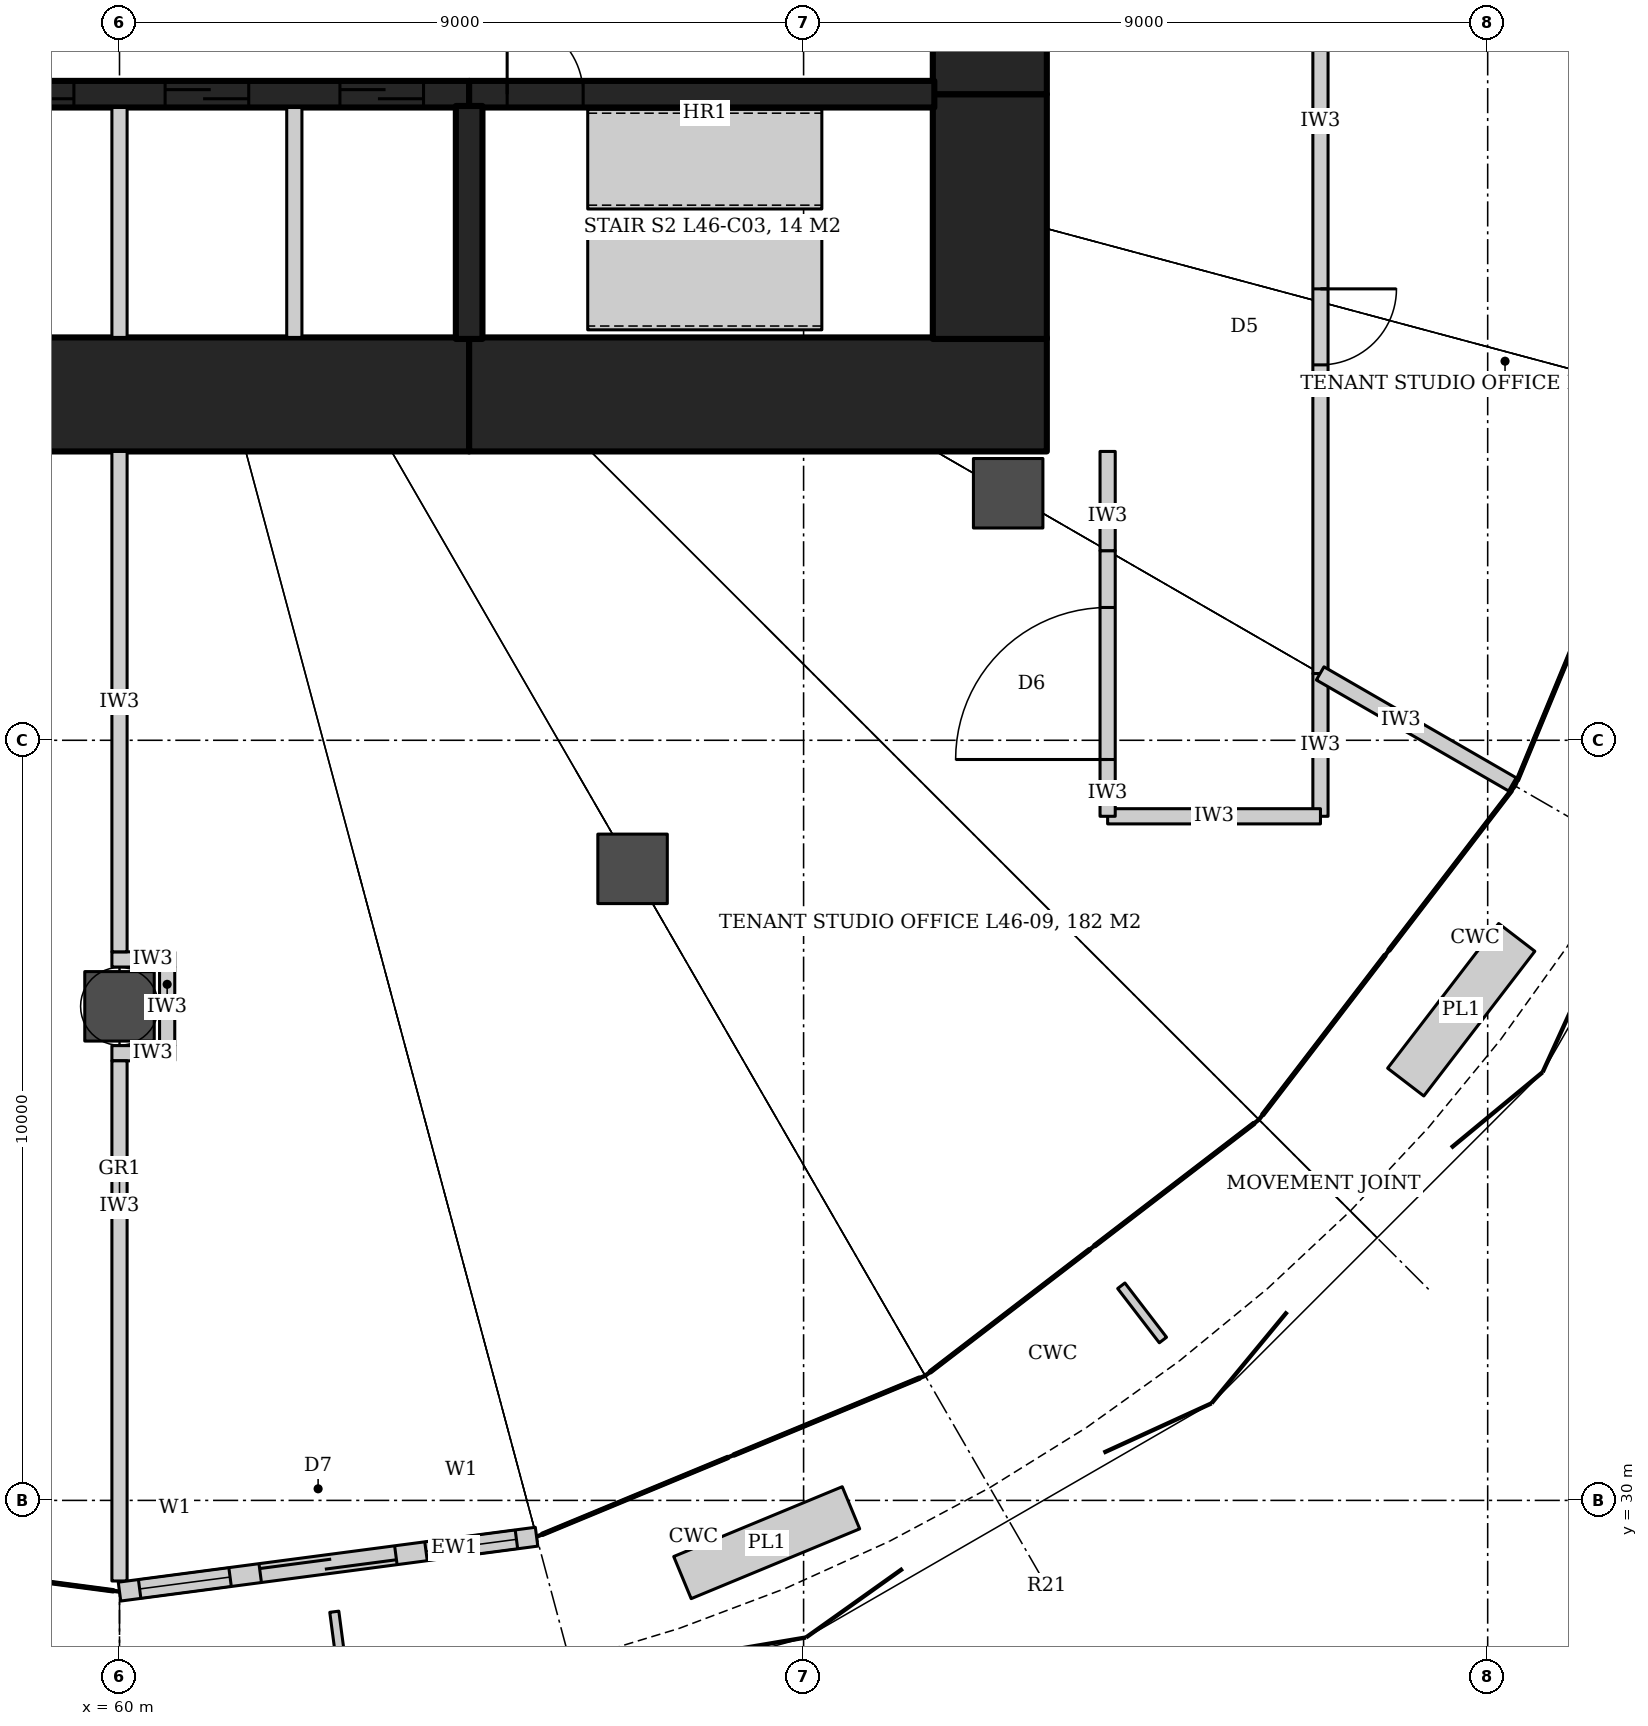
"""IFC4 building model, lengths in metres.
Left out: names, types, materials, properties, quantities, classifications, styles, units other than length and angle.
Written with IfcOpenShell. Run it as: python <this file> out.ifc"""

import sys

from ifc_helpers import new_model, si_unit, direction, frame, frame_2d, origin, origin_2d, place, context, subcontext, project, spatial, rectangle, hollow_circle, extrude, element, fill, save


model = new_model("IFC4")
c1 = context("Model", 3, precision=1e-05, world=origin(), true_north=direction((0.0, 1.0)))
c2 = subcontext(c1, "Body", "Model", "MODEL_VIEW")
j1 = project(units=[si_unit("LENGTHUNIT", "METRE"), si_unit("PLANEANGLEUNIT", "RADIAN")], contexts=[c1])
p1 = place(None, origin())
s1 = spatial("IfcSite", under=j1, at=p1, CompositionType="ELEMENT")
p2 = place(p1, origin())
s2 = spatial("IfcBuilding", under=s1, at=p2, CompositionType="ELEMENT")
p3 = place(p2, frame((0.0, 0.0, 202.4)))
s3 = spatial("IfcBuildingStorey", under=s2, at=p3, CompositionType="ELEMENT", Elevation=202.4)
p4 = place(p3, frame((55.4, 44.55, 0.0), z_axis=(0.0, 0.0, 1.0), x_axis=(1.0, 0.0, 0.0)))
e1 = element("IfcWall", 1, at=p4, inside=s3, PredefinedType="SHEAR", context=c2, shape_type="SweptSolid", body=[
    extrude(rectangle(XDim=9.2, YDim=1.5, at=frame_2d((4.6, 0.0))), origin(), (0.0, 0.0, 1.0), 4.2),
])
p5 = place(p3, frame((64.6, 44.55, 0.0), z_axis=(0.0, 0.0, 1.0), x_axis=(1.0, 0.0, 0.0)))
e2 = element("IfcWall", 2, at=p5, inside=s3, PredefinedType="SHEAR", context=c2, shape_type="SweptSolid", body=[
    extrude(rectangle(XDim=7.6, YDim=1.5, at=frame_2d((3.8, 0.0))), origin(), (0.0, 0.0, 1.0), 4.2),
])
p6 = place(p3, frame((71.45, 45.28, 0.0), z_axis=(0.0, 0.0, 1.0), x_axis=(0.0, 1.0, 0.0)))
e3 = element("IfcWall", 3, at=p6, inside=s3, PredefinedType="SHEAR", context=c2, shape_type="SweptSolid", body=[
    extrude(rectangle(XDim=3.22, YDim=1.5, at=frame_2d((1.61, 0.0))), origin(), (0.0, 0.0, 1.0), 4.2),
])
p7 = place(p3, frame((71.45, 48.5, 0.0), z_axis=(0.0, 0.0, 1.0), x_axis=(0.0, 1.0, 0.0)))
e4 = element("IfcWall", 4, at=p7, inside=s3, PredefinedType="SHEAR", context=c2, shape_type="SweptSolid", body=[
    extrude(rectangle(XDim=3.0, YDim=1.5, at=frame_2d((1.5, 0.0))), origin(), (0.0, 0.0, 1.0), 4.2),
])
p8 = place(p7, frame((0.6, 0.0, 0.0)))
e5 = element("IfcOpeningElement", 5, at=p8, cuts=e4, PredefinedType="OPENING", context=c2, shape_type="SweptSolid", body=[
    extrude(rectangle(XDim=1.8, YDim=2.1, at=frame_2d((0.9, 1.05))), frame((0.0, 0.76, 0.0), z_axis=(0.0, -1.0, 0.0), x_axis=(1.0, 0.0, 0.0)), (0.0, 0.0, 1.0), 1.52),
])
p9 = place(p3, frame((55.4, 48.5, 0.0), z_axis=(0.0, 0.0, 1.0), x_axis=(1.0, 0.0, 0.0)))
e6 = element("IfcWall", 6, at=p9, inside=s3, PredefinedType="SHEAR", context=c2, shape_type="SweptSolid", body=[
    extrude(rectangle(XDim=9.2, YDim=0.35, at=frame_2d((4.6, 0.0))), origin(), (0.0, 0.0, 1.0), 4.2),
])
p10 = place(p9, frame((0.6, 0.0, 0.0)))
e7 = element("IfcOpeningElement", 7, at=p10, cuts=e6, PredefinedType="OPENING", context=c2, shape_type="SweptSolid", body=[
    extrude(rectangle(XDim=1.1, YDim=2.1, at=frame_2d((0.55, 1.05))), frame((0.0, 0.185, 0.0), z_axis=(0.0, -1.0, 0.0), x_axis=(1.0, 0.0, 0.0)), (0.0, 0.0, 1.0), 0.37),
])
p11 = place(p9, frame((2.9, 0.0, 0.0)))
e8 = element("IfcOpeningElement", 8, at=p11, cuts=e6, PredefinedType="OPENING", context=c2, shape_type="SweptSolid", body=[
    extrude(rectangle(XDim=1.1, YDim=2.1, at=frame_2d((0.55, 1.05))), frame((0.0, 0.185, 0.0), z_axis=(0.0, -1.0, 0.0), x_axis=(1.0, 0.0, 0.0)), (0.0, 0.0, 1.0), 0.37),
])
p12 = place(p9, frame((5.2, 0.0, 0.0)))
e9 = element("IfcOpeningElement", 9, at=p12, cuts=e6, PredefinedType="OPENING", context=c2, shape_type="SweptSolid", body=[
    extrude(rectangle(XDim=1.1, YDim=2.1, at=frame_2d((0.55, 1.05))), frame((0.0, 0.185, 0.0), z_axis=(0.0, -1.0, 0.0), x_axis=(1.0, 0.0, 0.0)), (0.0, 0.0, 1.0), 0.37),
])
p13 = place(p9, frame((7.5, 0.0, 0.0)))
e10 = element("IfcOpeningElement", 10, at=p13, cuts=e6, PredefinedType="OPENING", context=c2, shape_type="SweptSolid", body=[
    extrude(rectangle(XDim=1.1, YDim=2.1, at=frame_2d((0.55, 1.05))), frame((0.0, 0.185, 0.0), z_axis=(0.0, -1.0, 0.0), x_axis=(1.0, 0.0, 0.0)), (0.0, 0.0, 1.0), 0.37),
])
p14 = place(p3, frame((64.6, 48.5, 0.0), z_axis=(0.0, 0.0, 1.0), x_axis=(1.0, 0.0, 0.0)))
e11 = element("IfcWall", 11, at=p14, inside=s3, PredefinedType="SHEAR", context=c2, shape_type="SweptSolid", body=[
    extrude(rectangle(XDim=6.12, YDim=0.35, at=frame_2d((3.06, 0.0))), origin(), (0.0, 0.0, 1.0), 4.2),
])
p15 = place(p14, frame((0.5, 0.0, 0.0)))
e12 = element("IfcOpeningElement", 12, at=p15, cuts=e11, PredefinedType="OPENING", context=c2, shape_type="SweptSolid", body=[
    extrude(rectangle(XDim=1.0, YDim=2.1, at=frame_2d((0.5, 1.05))), frame((0.0, 0.185, 0.0), z_axis=(0.0, -1.0, 0.0), x_axis=(1.0, 0.0, 0.0)), (0.0, 0.0, 1.0), 0.37),
])
p16 = place(p3, frame((64.6, 48.345, 0.0), z_axis=(0.0, 0.0, 1.0), x_axis=(0.0, -1.0, 0.0)))
e13 = element("IfcWall", 13, at=p16, inside=s3, PredefinedType="SHEAR", context=c2, shape_type="SweptSolid", body=[
    extrude(rectangle(XDim=3.065, YDim=0.35, at=frame_2d((1.532, 0.0))), origin(), (0.0, 0.0, 1.0), 4.2),
])
for number, where, z_axis, x_axis in (
    (14, (60.0, 36.5, 0.0), (0.0, 0.0, 1.0), (1.0, 0.0, 0.0)),
    (15, (66.75, 38.309, 0.0), (0.0, 0.0, 1.0), (1.0, 0.0, 0.0)),
    (16, (71.691, 43.25, 0.0), (0.0, 0.0, 1.0), (1.0, 0.0, 0.0)),
):
    element("IfcColumn", number, at=place(p3, frame(where, z_axis=z_axis, x_axis=x_axis)), inside=s3, PredefinedType="COLUMN", context=c2, shape_type="SweptSolid", body=[
        extrude(hollow_circle(Radius=0.457, WallThickness=0.045, at=origin_2d()), origin(), (0.0, 0.0, 1.0), 4.2),
    ])
p17 = place(p3, frame((75.8, 50.0, 0.0), z_axis=(0.0, 0.0, 1.0), x_axis=(0.0, -1.0, 0.0)))
e17 = element("IfcWall", 17, at=p17, inside=s3, PredefinedType="PARTITIONING", context=c2, shape_type="SweptSolid", body=[
    extrude(rectangle(XDim=9.122, YDim=0.2, at=frame_2d((4.561, 0.0))), origin(), (0.0, 0.0, 1.0), 3.012),
])
p18 = place(p17, frame((4.061, 0.0, 0.0)))
e18 = element("IfcOpeningElement", 18, at=p18, cuts=e17, PredefinedType="OPENING", context=c2, shape_type="SweptSolid", body=[
    extrude(rectangle(XDim=1.0, YDim=2.1, at=frame_2d((0.5, 1.05))), frame((0.0, 0.11, 0.0), z_axis=(0.0, -1.0, 0.0), x_axis=(1.0, 0.0, 0.0)), (0.0, 0.0, 1.0), 0.22),
])
p19 = place(p3, frame((75.8, 40.878, 0.0), z_axis=(0.0, 0.0, 1.0), x_axis=(0.0, -1.0, 0.0)))
e19 = element("IfcWall", 19, at=p19, inside=s3, PredefinedType="PARTITIONING", context=c2, shape_type="SweptSolid", body=[
    extrude(rectangle(XDim=1.878, YDim=0.2, at=frame_2d((0.939, 0.0))), origin(), (0.0, 0.0, 1.0), 3.012),
])
p20 = place(p3, frame((75.8, 39.0, 0.0), z_axis=(0.0, 0.0, 1.0), x_axis=(-1.0, 0.0, 0.0)))
e20 = element("IfcWall", 20, at=p20, inside=s3, PredefinedType="PARTITIONING", context=c2, shape_type="SweptSolid", body=[
    extrude(rectangle(XDim=2.8, YDim=0.2, at=frame_2d((1.4, 0.0))), origin(), (0.0, 0.0, 1.0), 3.04),
])
p21 = place(p3, frame((73.0, 39.0, 0.0), z_axis=(0.0, 0.0, 1.0), x_axis=(0.0, 1.0, 0.0)))
e21 = element("IfcWall", 21, at=p21, inside=s3, PredefinedType="PARTITIONING", context=c2, shape_type="SweptSolid", body=[
    extrude(rectangle(XDim=3.494, YDim=0.2, at=frame_2d((1.747, 0.0))), origin(), (0.0, 0.0, 1.0), 3.012),
])
p22 = place(p21, frame((0.747, 0.0, 0.0)))
e22 = element("IfcOpeningElement", 22, at=p22, cuts=e21, PredefinedType="OPENING", context=c2, shape_type="SweptSolid", body=[
    extrude(rectangle(XDim=2.0, YDim=2.1, at=frame_2d((1.0, 1.05))), frame((0.0, 0.11, 0.0), z_axis=(0.0, -1.0, 0.0), x_axis=(1.0, 0.0, 0.0)), (0.0, 0.0, 1.0), 0.22),
])
p23 = place(p3, frame((73.0, 42.494, 0.0), z_axis=(0.0, 0.0, 1.0), x_axis=(0.0, 1.0, 0.0)))
e23 = element("IfcWall", 23, at=p23, inside=s3, PredefinedType="PARTITIONING", context=c2, shape_type="SweptSolid", body=[
    extrude(rectangle(XDim=1.306, YDim=0.2, at=frame_2d((0.653, 0.0))), origin(), (0.0, 0.0, 1.0), 3.012),
])
for number, where, z_axis, x_axis in (
    (24, (59.9, 37.117, 0.0), (0.0, 0.0, 1.0), (1.0, 0.0, 0.0)),
    (25, (59.9, 35.883, 0.0), (0.0, 0.0, 1.0), (1.0, 0.0, 0.0)),
):
    element("IfcWall", number, at=place(p3, frame(where, z_axis=z_axis, x_axis=x_axis)), inside=s3, PredefinedType="PARTITIONING", context=c2, shape_type="SweptSolid", body=[
        extrude(rectangle(XDim=0.827, YDim=0.2, at=frame_2d((0.414, 0.0))), origin(), (0.0, 0.0, 1.0), 3.012),
    ])
p24 = place(p3, frame((60.627, 37.017, 0.0), z_axis=(0.0, 0.0, 1.0), x_axis=(0.0, -1.0, 0.0)))
e26 = element("IfcWall", 26, at=p24, inside=s3, PredefinedType="PARTITIONING", context=c2, shape_type="SweptSolid", body=[
    extrude(rectangle(XDim=1.034, YDim=0.2, at=frame_2d((0.517, 0.0))), origin(), (0.0, 0.0, 1.0), 3.012),
])
p25 = place(p3, frame((60.0, 43.8, 0.0), z_axis=(0.0, 0.0, 1.0), x_axis=(0.0, -1.0, 0.0)))
e27 = element("IfcWall", 27, at=p25, inside=s3, PredefinedType="PARTITIONING", context=c2, shape_type="SweptSolid", body=[
    extrude(rectangle(XDim=6.583, YDim=0.2, at=frame_2d((3.292, 0.0))), origin(), (0.0, 0.0, 1.0), 3.04),
])
p26 = place(p3, frame((60.0, 35.783, 0.0), z_axis=(0.0, 0.0, 1.0), x_axis=(0.0, -1.0, 0.0)))
e28 = element("IfcWall", 28, at=p26, inside=s3, PredefinedType="PARTITIONING", context=c2, shape_type="SweptSolid", body=[
    extrude(rectangle(XDim=6.843, YDim=0.2, at=frame_2d((3.421, 0.0))), origin(), (0.0, 0.0, 1.0), 3.012),
])
p27 = place(p3, frame((75.796, 40.88, 0.0), z_axis=(0.0, 0.0, 1.0), x_axis=(0.866032430508, -0.49998782916, 0.0)))
e29 = element("IfcWall", 29, at=p27, inside=s3, PredefinedType="PARTITIONING", context=c2, shape_type="SweptSolid", body=[
    extrude(rectangle(XDim=2.92, YDim=0.2, at=frame_2d((1.46, 0.0))), origin(), (0.0, 0.0, 1.0), 3.012),
])
p28 = place(p3, frame((60.0, 28.8, 0.0), z_axis=(0.0, 0.0, 1.0), x_axis=(0.991444232742, 0.130530967061, 0.0)))
e30 = element("IfcWall", 30, at=p28, inside=s3, PredefinedType="SOLIDWALL", context=c2, shape_type="SweptSolid", body=[
    extrude(rectangle(XDim=5.534, YDim=0.25, at=frame_2d((2.767, 0.0))), origin(), (0.0, 0.0, 1.0), 4.04),
])
p29 = place(p28, frame((1.867, 0.0, 0.0)))
e31 = element("IfcOpeningElement", 31, at=p29, cuts=e30, PredefinedType="OPENING", context=c2, shape_type="SweptSolid", body=[
    extrude(rectangle(XDim=1.8, YDim=2.4, at=frame_2d((0.9, 1.2))), frame((0.0, 0.135, 0.0), z_axis=(0.0, -1.0, 0.0), x_axis=(1.0, 0.0, 0.0)), (0.0, 0.0, 1.0), 0.27),
])
p30 = place(p28, frame((0.267, 0.0, 0.0)))
e32 = element("IfcOpeningElement", 32, at=p30, cuts=e30, PredefinedType="OPENING", context=c2, shape_type="SweptSolid", body=[
    extrude(rectangle(XDim=1.2, YDim=2.4, at=frame_2d((0.6, 1.2))), frame((0.0, 0.135, 0.0), z_axis=(0.0, -1.0, 0.0), x_axis=(1.0, 0.0, 0.0)), (0.0, 0.0, 1.0), 0.27),
])
p31 = place(p28, frame((4.067, 0.0, 0.0)))
e33 = element("IfcOpeningElement", 33, at=p31, cuts=e30, PredefinedType="OPENING", context=c2, shape_type="SweptSolid", body=[
    extrude(rectangle(XDim=1.2, YDim=2.4, at=frame_2d((0.6, 1.2))), frame((0.0, 0.135, 0.0), z_axis=(0.0, -1.0, 0.0), x_axis=(1.0, 0.0, 0.0)), (0.0, 0.0, 1.0), 0.27),
])
for number, where, z_axis, x_axis in (
    (34, (60.0, 45.3, 0.0), (0.0, 0.0, 1.0), (0.0, 1.0, 0.0)),
    (35, (62.3, 45.3, 0.0), (0.0, 0.0, 1.0), (0.0, 1.0, 0.0)),
):
    element("IfcWall", number, at=place(p3, frame(where, z_axis=z_axis, x_axis=x_axis)), inside=s3, PredefinedType="PARTITIONING", context=c2, shape_type="SweptSolid", body=[
        extrude(rectangle(XDim=3.025, YDim=0.2, at=frame_2d((1.512, 0.0))), origin(), (0.0, 0.0, 1.0), 4.2),
    ])
p32 = place(p22, origin())
e36 = element("IfcDoor", 36, at=p32, inside=s3, OperationType="DOUBLE_DOOR_DOUBLE_SWING", PredefinedType="DOOR", context=c2, shape_type="SweptSolid", body=[
    extrude(rectangle(XDim=2.0, YDim=2.1, at=frame_2d((1.0, 1.05))), frame((0.0, 0.025, 0.0), z_axis=(0.0, -1.0, 0.0), x_axis=(1.0, 0.0, 0.0)), (0.0, 0.0, 1.0), 0.05),
])
fill(e22, e36)
p33 = place(p18, origin())
e37 = element("IfcDoor", 37, at=p33, inside=s3, OperationType="SINGLE_SWING_LEFT", PredefinedType="DOOR", context=c2, shape_type="SweptSolid", body=[
    extrude(rectangle(XDim=1.0, YDim=2.1, at=frame_2d((0.5, 1.05))), frame((0.0, 0.025, 0.0), z_axis=(0.0, -1.0, 0.0), x_axis=(1.0, 0.0, 0.0)), (0.0, 0.0, 1.0), 0.05),
])
fill(e18, e37)
p34 = place(p29, origin())
e38 = element("IfcDoor", 38, at=p34, inside=s3, OperationType="DOUBLE_DOOR_SLIDING", PredefinedType="DOOR", context=c2, shape_type="SweptSolid", body=[
    extrude(rectangle(XDim=1.8, YDim=2.4, at=frame_2d((0.9, 1.2))), frame((0.0, 0.025, 0.0), z_axis=(0.0, -1.0, 0.0), x_axis=(1.0, 0.0, 0.0)), (0.0, 0.0, 1.0), 0.05),
])
fill(e31, e38)
p35 = place(p30, origin())
e39 = element("IfcWindow", 39, at=p35, inside=s3, PartitioningType="SINGLE_PANEL", PredefinedType="WINDOW", context=c2, shape_type="SweptSolid", body=[
    extrude(rectangle(XDim=1.2, YDim=2.4, at=frame_2d((0.6, 1.2))), frame((0.0, 0.03, 0.0), z_axis=(0.0, -1.0, 0.0), x_axis=(1.0, 0.0, 0.0)), (0.0, 0.0, 1.0), 0.06),
])
fill(e32, e39)
p36 = place(p31, origin())
e40 = element("IfcWindow", 40, at=p36, inside=s3, PartitioningType="SINGLE_PANEL", PredefinedType="WINDOW", context=c2, shape_type="SweptSolid", body=[
    extrude(rectangle(XDim=1.2, YDim=2.4, at=frame_2d((0.6, 1.2))), frame((0.0, 0.03, 0.0), z_axis=(0.0, -1.0, 0.0), x_axis=(1.0, 0.0, 0.0)), (0.0, 0.0, 1.0), 0.06),
])
fill(e33, e40)
p37 = place(p15, origin())
e41 = element("IfcDoor", 41, at=p37, inside=s3, OperationType="SINGLE_SWING_LEFT", PredefinedType="DOOR", context=c2, shape_type="SweptSolid", body=[
    extrude(rectangle(XDim=1.0, YDim=2.1, at=frame_2d((0.5, 1.05))), frame((0.0, 0.025, 0.0), z_axis=(0.0, -1.0, 0.0), x_axis=(1.0, 0.0, 0.0)), (0.0, 0.0, 1.0), 0.05),
])
fill(e12, e41)
p38 = place(p11, origin())
e42 = element("IfcDoor", 42, at=p38, inside=s3, OperationType="SLIDING_TO_LEFT", PredefinedType="DOOR", context=c2, shape_type="SweptSolid", body=[
    extrude(rectangle(XDim=1.1, YDim=2.1, at=frame_2d((0.55, 1.05))), frame((0.0, 0.025, 0.0), z_axis=(0.0, -1.0, 0.0), x_axis=(1.0, 0.0, 0.0)), (0.0, 0.0, 1.0), 0.05),
])
fill(e8, e42)
p39 = place(p12, origin())
e43 = element("IfcDoor", 43, at=p39, inside=s3, OperationType="SLIDING_TO_LEFT", PredefinedType="DOOR", context=c2, shape_type="SweptSolid", body=[
    extrude(rectangle(XDim=1.1, YDim=2.1, at=frame_2d((0.55, 1.05))), frame((0.0, 0.025, 0.0), z_axis=(0.0, -1.0, 0.0), x_axis=(1.0, 0.0, 0.0)), (0.0, 0.0, 1.0), 0.05),
])
fill(e9, e43)
p40 = place(p13, origin())
e44 = element("IfcDoor", 44, at=p40, inside=s3, OperationType="SLIDING_TO_LEFT", PredefinedType="DOOR", context=c2, shape_type="SweptSolid", body=[
    extrude(rectangle(XDim=1.1, YDim=2.1, at=frame_2d((0.55, 1.05))), frame((0.0, 0.025, 0.0), z_axis=(0.0, -1.0, 0.0), x_axis=(1.0, 0.0, 0.0)), (0.0, 0.0, 1.0), 0.05),
])
fill(e10, e44)
save(model, sys.argv[1])
